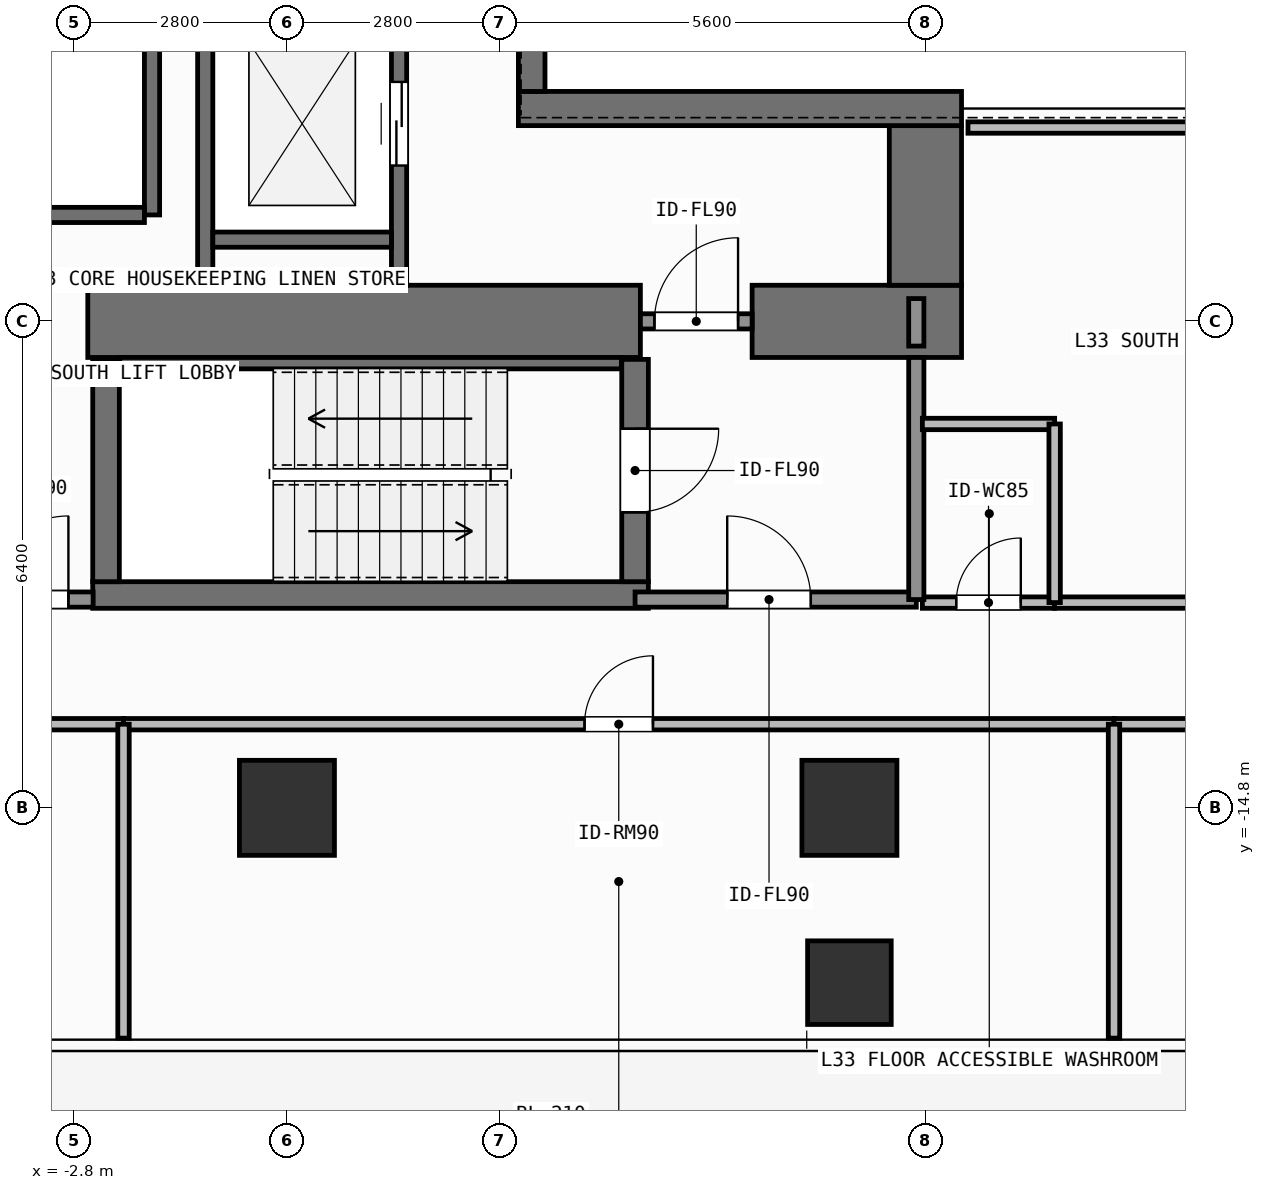
"""IFC4 building model, lengths in metres.
Left out: names, types, materials, properties, quantities, classifications, styles, units other than length and angle.
Written with IfcOpenShell. Run it as: python <this file> out.ifc"""

import sys

from ifc_helpers import new_model, si_unit, direction, frame, frame_2d, origin, origin_2d, place, context, subcontext, project, spatial, rectangle, extrude, element, fill, save


model = new_model("IFC4")
c1 = context("Model", 3, precision=1e-05, world=origin(), true_north=direction((0.0, 1.0)))
c2 = subcontext(c1, "Body", "Model", "MODEL_VIEW")
j1 = project(units=[si_unit("LENGTHUNIT", "METRE"), si_unit("PLANEANGLEUNIT", "RADIAN")], contexts=[c1])
p1 = place(None, origin())
s1 = spatial("IfcSite", under=j1, at=p1, CompositionType="ELEMENT")
p2 = place(p1, origin())
s2 = spatial("IfcBuilding", under=s1, at=p2, CompositionType="ELEMENT")
p3 = place(p2, frame((0.0, 0.0, 132.9)))
s3 = spatial("IfcBuildingStorey", under=s2, at=p3, CompositionType="ELEMENT", Elevation=132.9)
p4 = place(p3, frame((-2.62, -8.4, 0.0), z_axis=(0.0, 0.0, 1.0), x_axis=(1.0, 0.0, 0.0)))
e1 = element("IfcWall", 1, at=p4, inside=s3, PredefinedType="SHEAR", context=c2, shape_type="SweptSolid", body=[
    extrude(rectangle(XDim=7.27, YDim=0.95, at=frame_2d((3.635, 0.0))), origin(), (0.0, 0.0, 1.0), 3.9),
])
p5 = place(p3, frame((6.12, -8.4, 0.0), z_axis=(0.0, 0.0, 1.0), x_axis=(1.0, 0.0, 0.0)))
e2 = element("IfcWall", 2, at=p5, inside=s3, PredefinedType="SHEAR", context=c2, shape_type="SweptSolid", body=[
    extrude(rectangle(XDim=2.755, YDim=0.95, at=frame_2d((1.377, 0.0))), origin(), (0.0, 0.0, 1.0), 3.9),
])
p6 = place(p3, frame((8.4, -7.925, 0.0), z_axis=(0.0, 0.0, 1.0), x_axis=(0.0, 1.0, 0.0)))
e3 = element("IfcWall", 3, at=p6, inside=s3, PredefinedType="SHEAR", context=c2, shape_type="SweptSolid", body=[
    extrude(rectangle(XDim=2.1, YDim=0.95, at=frame_2d((1.05, 0.0))), origin(), (0.0, 0.0, 1.0), 3.9),
])
p7 = place(p3, frame((3.045, -5.6, 0.0), z_axis=(0.0, 0.0, 1.0), x_axis=(1.0, 0.0, 0.0)))
e4 = element("IfcWall", 4, at=p7, inside=s3, PredefinedType="SHEAR", context=c2, shape_type="SweptSolid", body=[
    extrude(rectangle(XDim=5.83, YDim=0.45, at=frame_2d((2.915, 0.0))), origin(), (0.0, 0.0, 1.0), 3.9),
])
p8 = place(p3, frame((3.22, -5.375, 0.0), z_axis=(0.0, 0.0, 1.0), x_axis=(0.0, 1.0, 0.0)))
e5 = element("IfcWall", 5, at=p8, inside=s3, PredefinedType="SHEAR", context=c2, shape_type="SweptSolid", body=[
    extrude(rectangle(XDim=10.75, YDim=0.35, at=frame_2d((5.375, 0.0))), origin(), (0.0, 0.0, 1.0), 3.9),
])
p9 = place(p3, frame((-2.555, -12.0, 0.0), z_axis=(0.0, 0.0, 1.0), x_axis=(1.0, 0.0, 0.0)))
e6 = element("IfcWall", 6, at=p9, inside=s3, PredefinedType="SHEAR", context=c2, shape_type="SweptSolid", body=[
    extrude(rectangle(XDim=7.31, YDim=0.35, at=frame_2d((3.655, 0.0))), origin(), (0.0, 0.0, 1.0), 3.9),
])
p10 = place(p3, frame((-2.2, -8.95, 0.0), z_axis=(0.0, 0.0, 1.0), x_axis=(1.0, 0.0, 0.0)))
e7 = element("IfcWall", 7, at=p10, inside=s3, PredefinedType="SHEAR", context=c2, shape_type="SweptSolid", body=[
    extrude(rectangle(XDim=6.6, YDim=0.15, at=frame_2d((3.3, 0.0))), origin(), (0.0, 0.0, 1.0), 3.9),
])
p11 = place(p3, frame((-2.38, -11.825, 0.0), z_axis=(0.0, 0.0, 1.0), x_axis=(0.0, 1.0, 0.0)))
e8 = element("IfcWall", 8, at=p11, inside=s3, PredefinedType="SHEAR", context=c2, shape_type="SweptSolid", body=[
    extrude(rectangle(XDim=2.925, YDim=0.35, at=frame_2d((1.462, 0.0))), origin(), (0.0, 0.0, 1.0), 3.9),
])
p12 = place(p3, frame((4.58, -8.9, 0.0), z_axis=(0.0, 0.0, 1.0), x_axis=(0.0, -1.0, 0.0)))
e9 = element("IfcWall", 9, at=p12, inside=s3, PredefinedType="SHEAR", context=c2, shape_type="SweptSolid", body=[
    extrude(rectangle(XDim=2.925, YDim=0.35, at=frame_2d((1.462, 0.0))), origin(), (0.0, 0.0, 1.0), 3.9),
])
p13 = place(p12, frame((0.913, 0.0, 0.0)))
e10 = element("IfcOpeningElement", 10, at=p13, cuts=e9, PredefinedType="OPENING", context=c2, shape_type="SweptSolid", body=[
    extrude(rectangle(XDim=1.1, YDim=2.15, at=frame_2d((0.55, 1.075))), frame((0.0, 0.185, 0.0), z_axis=(0.0, -1.0, 0.0), x_axis=(1.0, 0.0, 0.0)), (0.0, 0.0, 1.0), 0.37),
])
for number, where, z_axis, x_axis in (
    (11, (0.0, -14.8, 0.0), (0.0, 0.0, 1.0), (1.0, 0.0, 0.0)),
    (12, (7.4, -14.8, 0.0), (0.0, 0.0, 1.0), (1.0, 0.0, 0.0)),
):
    element("IfcColumn", number, at=place(p3, frame(where, z_axis=z_axis, x_axis=x_axis)), inside=s3, PredefinedType="COLUMN", context=c2, shape_type="SweptSolid", body=[
        extrude(rectangle(XDim=1.25, YDim=1.25, at=origin_2d()), origin(), (0.0, 0.0, 1.0), 3.9),
    ])
p14 = place(p3, frame((7.4, -17.1, 0.0), z_axis=(0.0, 0.0, 1.0), x_axis=(1.0, 0.0, 0.0)))
e13 = element("IfcColumn", 13, at=p14, inside=s3, PredefinedType="COLUMN", context=c2, shape_type="SweptSolid", body=[
    extrude(rectangle(XDim=1.1, YDim=1.1, at=origin_2d()), origin(), (0.0, 0.0, 1.0), 3.9),
])
p15 = place(p3, frame((-1.775, -7.0, 0.0), z_axis=(0.0, 0.0, 1.0), x_axis=(0.0, 1.0, 0.0)))
e14 = element("IfcWall", 14, at=p15, inside=s3, PredefinedType="SHEAR", context=c2, shape_type="SweptSolid", body=[
    extrude(rectangle(XDim=2.8, YDim=0.2, at=frame_2d((1.4, 0.0))), origin(), (0.0, 0.0, 1.0), 3.62),
])
p16 = place(p3, frame((-4.325, -7.0, 0.0), z_axis=(0.0, 0.0, 1.0), x_axis=(1.0, 0.0, 0.0)))
e15 = element("IfcWall", 15, at=p16, inside=s3, PredefinedType="SHEAR", context=c2, shape_type="SweptSolid", body=[
    extrude(rectangle(XDim=2.45, YDim=0.2, at=frame_2d((1.225, 0.0))), origin(), (0.0, 0.0, 1.0), 3.62),
])
p17 = place(p3, frame((-1.075, -7.925, 0.0), z_axis=(0.0, 0.0, 1.0), x_axis=(0.0, 1.0, 0.0)))
e16 = element("IfcWall", 16, at=p17, inside=s3, PredefinedType="SHEAR", context=c2, shape_type="SweptSolid", body=[
    extrude(rectangle(XDim=3.65, YDim=0.2, at=frame_2d((1.825, 0.0))), origin(), (0.0, 0.0, 1.0), 3.62),
])
p18 = place(p3, frame((1.475, -7.925, 0.0), z_axis=(0.0, 0.0, 1.0), x_axis=(0.0, 1.0, 0.0)))
e17 = element("IfcWall", 17, at=p18, inside=s3, PredefinedType="SHEAR", context=c2, shape_type="SweptSolid", body=[
    extrude(rectangle(XDim=3.65, YDim=0.2, at=frame_2d((1.825, 0.0))), origin(), (0.0, 0.0, 1.0), 3.62),
])
p19 = place(p18, frame((1.575, 0.0, 0.0)))
e18 = element("IfcOpeningElement", 18, at=p19, cuts=e17, PredefinedType="OPENING", context=c2, shape_type="SweptSolid", body=[
    extrude(rectangle(XDim=1.1, YDim=2.2, at=frame_2d((0.55, 1.1))), frame((0.0, 0.11, 0.0), z_axis=(0.0, -1.0, 0.0), x_axis=(1.0, 0.0, 0.0)), (0.0, 0.0, 1.0), 0.22),
])
p20 = place(p3, frame((-0.975, -7.325, 0.0), z_axis=(0.0, 0.0, 1.0), x_axis=(1.0, 0.0, 0.0)))
e19 = element("IfcWall", 19, at=p20, inside=s3, PredefinedType="SHEAR", context=c2, shape_type="SweptSolid", body=[
    extrude(rectangle(XDim=2.35, YDim=0.2, at=frame_2d((1.175, 0.0))), origin(), (0.0, 0.0, 1.0), 3.62),
])
p21 = place(p3, frame((4.58, -12.06, 0.0), z_axis=(0.0, 0.0, 1.0), x_axis=(1.0, 0.0, 0.0)))
e20 = element("IfcWall", 20, at=p21, inside=s3, PredefinedType="SOLIDWALL", context=c2, shape_type="SweptSolid", body=[
    extrude(rectangle(XDim=3.7, YDim=0.2, at=frame_2d((1.85, 0.0))), origin(), (0.0, 0.0, 1.0), 3.62),
])
p22 = place(p21, frame((1.212, 0.0, 0.0)))
e21 = element("IfcOpeningElement", 21, at=p22, cuts=e20, PredefinedType="OPENING", context=c2, shape_type="SweptSolid", body=[
    extrude(rectangle(XDim=1.1, YDim=2.15, at=frame_2d((0.55, 1.075))), frame((0.0, 0.11, 0.0), z_axis=(0.0, -1.0, 0.0), x_axis=(1.0, 0.0, 0.0)), (0.0, 0.0, 1.0), 0.22),
])
p23 = place(p3, frame((4.65, -8.4, 0.0), z_axis=(0.0, 0.0, 1.0), x_axis=(1.0, 0.0, 0.0)))
e22 = element("IfcWall", 22, at=p23, inside=s3, PredefinedType="SOLIDWALL", context=c2, shape_type="SweptSolid", body=[
    extrude(rectangle(XDim=1.47, YDim=0.2, at=frame_2d((0.735, 0.0))), origin(), (0.0, 0.0, 1.0), 2.66),
])
p24 = place(p23, frame((0.185, 0.0, 0.0)))
e23 = element("IfcOpeningElement", 23, at=p24, cuts=e22, PredefinedType="OPENING", context=c2, shape_type="SweptSolid", body=[
    extrude(rectangle(XDim=1.1, YDim=2.15, at=frame_2d((0.55, 1.075))), frame((0.0, 0.11, 0.0), z_axis=(0.0, -1.0, 0.0), x_axis=(1.0, 0.0, 0.0)), (0.0, 0.0, 1.0), 0.22),
])
p25 = place(p3, frame((-4.3, -12.06, 0.0), z_axis=(0.0, 0.0, 1.0), x_axis=(1.0, 0.0, 0.0)))
e24 = element("IfcWall", 24, at=p25, inside=s3, PredefinedType="SOLIDWALL", context=c2, shape_type="SweptSolid", body=[
    extrude(rectangle(XDim=1.75, YDim=0.2, at=frame_2d((0.875, 0.0))), origin(), (0.0, 0.0, 1.0), 3.62),
])
p26 = place(p25, frame((0.325, 0.0, 0.0)))
e25 = element("IfcOpeningElement", 25, at=p26, cuts=e24, PredefinedType="OPENING", context=c2, shape_type="SweptSolid", body=[
    extrude(rectangle(XDim=1.1, YDim=2.15, at=frame_2d((0.55, 1.075))), frame((0.0, 0.11, 0.0), z_axis=(0.0, -1.0, 0.0), x_axis=(1.0, 0.0, 0.0)), (0.0, 0.0, 1.0), 0.22),
])
p27 = place(p3, frame((8.36, -12.1, 0.0), z_axis=(0.0, 0.0, 1.0), x_axis=(1.0, 0.0, 0.0)))
e26 = element("IfcWall", 26, at=p27, inside=s3, PredefinedType="PARTITIONING", context=c2, shape_type="SweptSolid", body=[
    extrude(rectangle(XDim=1.74, YDim=0.15, at=frame_2d((0.87, 0.0))), origin(), (0.0, 0.0, 1.0), 3.62),
])
p28 = place(p27, frame((0.445, 0.0, 0.0)))
e27 = element("IfcOpeningElement", 27, at=p28, cuts=e26, PredefinedType="OPENING", context=c2, shape_type="SweptSolid", body=[
    extrude(rectangle(XDim=0.85, YDim=2.1, at=frame_2d((0.425, 1.05))), frame((0.0, 0.085, 0.0), z_axis=(0.0, -1.0, 0.0), x_axis=(1.0, 0.0, 0.0)), (0.0, 0.0, 1.0), 0.17),
])
p29 = place(p3, frame((10.1, -12.1, 0.0), z_axis=(0.0, 0.0, 1.0), x_axis=(1.0, 0.0, 0.0)))
e28 = element("IfcWall", 28, at=p29, inside=s3, PredefinedType="PARTITIONING", context=c2, shape_type="SweptSolid", body=[
    extrude(rectangle(XDim=5.48, YDim=0.15, at=frame_2d((2.74, 0.0))), origin(), (0.0, 0.0, 1.0), 3.62),
])
p30 = place(p29, frame((2.29, 0.0, 0.0)))
e29 = element("IfcOpeningElement", 29, at=p30, cuts=e28, PredefinedType="OPENING", context=c2, shape_type="SweptSolid", body=[
    extrude(rectangle(XDim=0.9, YDim=2.1, at=frame_2d((0.45, 1.05))), frame((0.0, 0.085, 0.0), z_axis=(0.0, -1.0, 0.0), x_axis=(1.0, 0.0, 0.0)), (0.0, 0.0, 1.0), 0.17),
])
p31 = place(p3, frame((-19.33, -13.7, 0.0), z_axis=(0.0, 0.0, 1.0), x_axis=(1.0, 0.0, 0.0)))
e30 = element("IfcWall", 30, at=p31, inside=s3, PredefinedType="PARTITIONING", context=c2, shape_type="SweptSolid", body=[
    extrude(rectangle(XDim=17.18, YDim=0.15, at=frame_2d((8.59, 0.0))), origin(), (0.0, 0.0, 1.0), 3.62),
])
p32 = place(p31, frame((8.05, 0.0, 0.0)))
e31 = element("IfcOpeningElement", 31, at=p32, cuts=e30, PredefinedType="OPENING", context=c2, shape_type="SweptSolid", body=[
    extrude(rectangle(XDim=0.9, YDim=2.1, at=frame_2d((0.45, 1.05))), frame((0.0, 0.085, 0.0), z_axis=(0.0, -1.0, 0.0), x_axis=(1.0, 0.0, 0.0)), (0.0, 0.0, 1.0), 0.17),
])
p33 = place(p3, frame((-2.15, -13.7, 0.0), z_axis=(0.0, 0.0, 1.0), x_axis=(1.0, 0.0, 0.0)))
e32 = element("IfcWall", 32, at=p33, inside=s3, PredefinedType="PARTITIONING", context=c2, shape_type="SweptSolid", body=[
    extrude(rectangle(XDim=13.031, YDim=0.15, at=frame_2d((6.516, 0.0))), origin(), (0.0, 0.0, 1.0), 3.62),
])
p34 = place(p33, frame((6.065, 0.0, 0.0)))
e33 = element("IfcOpeningElement", 33, at=p34, cuts=e32, PredefinedType="OPENING", context=c2, shape_type="SweptSolid", body=[
    extrude(rectangle(XDim=0.9, YDim=2.1, at=frame_2d((0.45, 1.05))), frame((0.0, 0.085, 0.0), z_axis=(0.0, -1.0, 0.0), x_axis=(1.0, 0.0, 0.0)), (0.0, 0.0, 1.0), 0.17),
])
p35 = place(p3, frame((10.881, -13.7, 0.0), z_axis=(0.0, 0.0, 1.0), x_axis=(1.0, 0.0, 0.0)))
e34 = element("IfcWall", 34, at=p35, inside=s3, PredefinedType="PARTITIONING", context=c2, shape_type="SweptSolid", body=[
    extrude(rectangle(XDim=16.249, YDim=0.15, at=frame_2d((8.125, 0.0))), origin(), (0.0, 0.0, 1.0), 3.62),
])
p36 = place(p35, frame((6.959, 0.0, 0.0)))
e35 = element("IfcOpeningElement", 35, at=p36, cuts=e34, PredefinedType="OPENING", context=c2, shape_type="SweptSolid", body=[
    extrude(rectangle(XDim=0.9, YDim=2.1, at=frame_2d((0.45, 1.05))), frame((0.0, 0.085, 0.0), z_axis=(0.0, -1.0, 0.0), x_axis=(1.0, 0.0, 0.0)), (0.0, 0.0, 1.0), 0.17),
])
p37 = place(p3, frame((8.28, -12.06, 0.0), z_axis=(0.0, 0.0, 1.0), x_axis=(0.0, 1.0, 0.0)))
e36 = element("IfcWall", 36, at=p37, inside=s3, PredefinedType="SOLIDWALL", context=c2, shape_type="SweptSolid", body=[
    extrude(rectangle(XDim=3.185, YDim=0.2, at=frame_2d((1.593, 0.0))), origin(), (0.0, 0.0, 1.0), 3.62),
])
p38 = place(p3, frame((8.28, -8.725, 0.0), z_axis=(0.0, 0.0, 1.0), x_axis=(0.0, 1.0, 0.0)))
e37 = element("IfcWall", 37, at=p38, inside=s3, PredefinedType="SOLIDWALL", context=c2, shape_type="SweptSolid", body=[
    extrude(rectangle(XDim=0.625, YDim=0.2, at=frame_2d((0.312, 0.0))), origin(), (0.0, 0.0, 1.0), 3.62),
])
p39 = place(p3, frame((8.36, -9.75, 0.0), z_axis=(0.0, 0.0, 1.0), x_axis=(1.0, 0.0, 0.0)))
e38 = element("IfcWall", 38, at=p39, inside=s3, PredefinedType="PARTITIONING", context=c2, shape_type="SweptSolid", body=[
    extrude(rectangle(XDim=1.74, YDim=0.15, at=frame_2d((0.87, 0.0))), origin(), (0.0, 0.0, 1.0), 3.62),
])
p40 = place(p3, frame((10.1, -12.1, 0.0), z_axis=(0.0, 0.0, 1.0), x_axis=(0.0, 1.0, 0.0)))
e39 = element("IfcWall", 39, at=p40, inside=s3, PredefinedType="PARTITIONING", context=c2, shape_type="SweptSolid", body=[
    extrude(rectangle(XDim=2.35, YDim=0.15, at=frame_2d((1.175, 0.0))), origin(), (0.0, 0.0, 1.0), 3.62),
])
p41 = place(p3, frame((8.96, -5.85, 0.0), z_axis=(0.0, 0.0, 1.0), x_axis=(1.0, 0.0, 0.0)))
e40 = element("IfcWall", 40, at=p41, inside=s3, PredefinedType="PARTITIONING", context=c2, shape_type="SweptSolid", body=[
    extrude(rectangle(XDim=6.62, YDim=0.15, at=frame_2d((3.31, 0.0))), origin(), (0.0, 0.0, 1.0), 3.62),
])
p42 = place(p3, frame((-2.15, -17.83, 0.0), z_axis=(0.0, 0.0, 1.0), x_axis=(0.0, 1.0, 0.0)))
e41 = element("IfcWall", 41, at=p42, inside=s3, PredefinedType="PARTITIONING", context=c2, shape_type="SweptSolid", body=[
    extrude(rectangle(XDim=4.13, YDim=0.15, at=frame_2d((2.065, 0.0))), origin(), (0.0, 0.0, 1.0), 3.62),
])
p43 = place(p3, frame((10.881, -17.83, 0.0), z_axis=(0.0, 0.0, 1.0), x_axis=(0.0, 1.0, 0.0)))
e42 = element("IfcWall", 42, at=p43, inside=s3, PredefinedType="PARTITIONING", context=c2, shape_type="SweptSolid", body=[
    extrude(rectangle(XDim=4.13, YDim=0.15, at=frame_2d((2.065, 0.0))), origin(), (0.0, 0.0, 1.0), 3.31),
])
p44 = place(p19, origin())
e43 = element("IfcDoor", 43, at=p44, inside=s3, OperationType="SLIDING_TO_LEFT", PredefinedType="DOOR", context=c2, shape_type="SweptSolid", body=[
    extrude(rectangle(XDim=1.1, YDim=2.2, at=frame_2d((0.55, 1.1))), frame((0.0, 0.025, 0.0), z_axis=(0.0, -1.0, 0.0), x_axis=(1.0, 0.0, 0.0)), (0.0, 0.0, 1.0), 0.05),
])
fill(e18, e43)
p45 = place(p13, origin())
e44 = element("IfcDoor", 44, at=p45, inside=s3, OperationType="SINGLE_SWING_LEFT", PredefinedType="DOOR", context=c2, shape_type="SweptSolid", body=[
    extrude(rectangle(XDim=1.1, YDim=2.15, at=frame_2d((0.55, 1.075))), frame((0.0, 0.025, 0.0), z_axis=(0.0, -1.0, 0.0), x_axis=(1.0, 0.0, 0.0)), (0.0, 0.0, 1.0), 0.05),
])
fill(e10, e44)
p46 = place(p22, origin())
e45 = element("IfcDoor", 45, at=p46, inside=s3, OperationType="SINGLE_SWING_LEFT", PredefinedType="DOOR", context=c2, shape_type="SweptSolid", body=[
    extrude(rectangle(XDim=1.1, YDim=2.15, at=frame_2d((0.55, 1.075))), frame((0.0, 0.025, 0.0), z_axis=(0.0, -1.0, 0.0), x_axis=(1.0, 0.0, 0.0)), (0.0, 0.0, 1.0), 0.05),
])
fill(e21, e45)
p47 = place(p24, origin())
e46 = element("IfcDoor", 46, at=p47, inside=s3, OperationType="SINGLE_SWING_RIGHT", PredefinedType="DOOR", context=c2, shape_type="SweptSolid", body=[
    extrude(rectangle(XDim=1.1, YDim=2.15, at=frame_2d((0.55, 1.075))), frame((0.0, 0.025, 0.0), z_axis=(0.0, -1.0, 0.0), x_axis=(1.0, 0.0, 0.0)), (0.0, 0.0, 1.0), 0.05),
])
fill(e23, e46)
p48 = place(p26, origin())
e47 = element("IfcDoor", 47, at=p48, inside=s3, OperationType="SINGLE_SWING_RIGHT", PredefinedType="DOOR", context=c2, shape_type="SweptSolid", body=[
    extrude(rectangle(XDim=1.1, YDim=2.15, at=frame_2d((0.55, 1.075))), frame((0.0, 0.025, 0.0), z_axis=(0.0, -1.0, 0.0), x_axis=(1.0, 0.0, 0.0)), (0.0, 0.0, 1.0), 0.05),
])
fill(e25, e47)
p49 = place(p28, origin())
e48 = element("IfcDoor", 48, at=p49, inside=s3, OperationType="SINGLE_SWING_RIGHT", PredefinedType="DOOR", context=c2, shape_type="SweptSolid", body=[
    extrude(rectangle(XDim=0.85, YDim=2.1, at=frame_2d((0.425, 1.05))), frame((0.0, 0.025, 0.0), z_axis=(0.0, -1.0, 0.0), x_axis=(1.0, 0.0, 0.0)), (0.0, 0.0, 1.0), 0.05),
])
fill(e27, e48)
p50 = place(p34, origin())
e49 = element("IfcDoor", 49, at=p50, inside=s3, OperationType="SINGLE_SWING_RIGHT", PredefinedType="DOOR", context=c2, shape_type="SweptSolid", body=[
    extrude(rectangle(XDim=0.9, YDim=2.1, at=frame_2d((0.45, 1.05))), frame((0.0, 0.025, 0.0), z_axis=(0.0, -1.0, 0.0), x_axis=(1.0, 0.0, 0.0)), (0.0, 0.0, 1.0), 0.05),
])
fill(e33, e49)
save(model, sys.argv[1])
